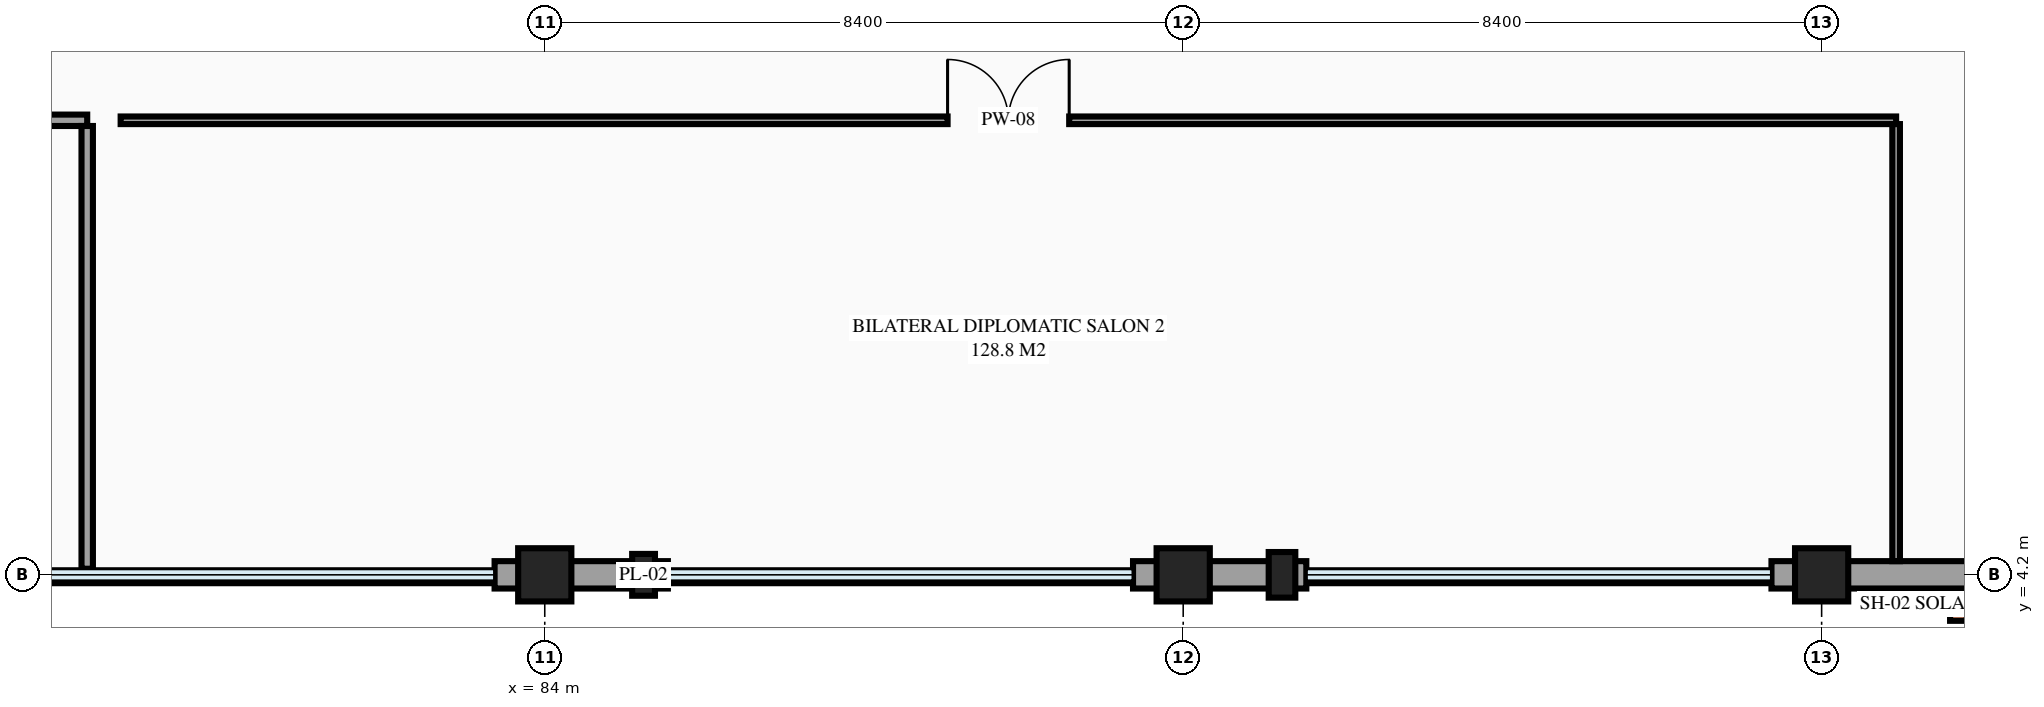
"""IFC4 building model, lengths in metres.
Left out: names, types, materials, properties, quantities, classifications, styles, units other than length and angle.
Written with IfcOpenShell. Run it as: python <this file> out.ifc"""

import sys

from ifc_helpers import new_model, si_unit, direction, frame, frame_2d, origin, origin_2d, place, context, subcontext, project, spatial, rectangle, extrude, element, fill, save


model = new_model("IFC4")
c1 = context("Model", 3, precision=1e-05, world=origin(), true_north=direction((0.0, 1.0)))
c2 = subcontext(c1, "Body", "Model", "MODEL_VIEW")
j1 = project(units=[si_unit("LENGTHUNIT", "METRE"), si_unit("PLANEANGLEUNIT", "RADIAN")], contexts=[c1])
p1 = place(None, origin())
s1 = spatial("IfcSite", under=j1, at=p1, CompositionType="ELEMENT")
p2 = place(p1, origin())
s2 = spatial("IfcBuilding", under=s1, at=p2, CompositionType="ELEMENT")
p3 = place(p2, frame((0.0, 0.0, 14.1)))
s3 = spatial("IfcBuildingStorey", under=s2, at=p3, CompositionType="ELEMENT", Elevation=14.1)
for number, where, z_axis, x_axis in (
    (1, (84.0, 4.2, 0.0), (0.0, 0.0, 1.0), (1.0, 0.0, 0.0)),
    (2, (92.4, 4.2, 0.0), (0.0, 0.0, 1.0), (1.0, 0.0, 0.0)),
    (3, (100.8, 4.2, 0.0), (0.0, 0.0, 1.0), (1.0, 0.0, 0.0)),
):
    element("IfcColumn", number, at=place(p3, frame(where, z_axis=z_axis, x_axis=x_axis)), inside=s3, PredefinedType="COLUMN", context=c2, shape_type="SweptSolid", body=[
        extrude(rectangle(XDim=0.7, YDim=0.7, at=origin_2d()), origin(), (0.0, 0.0, 1.0), 4.2),
    ])
p4 = place(p3, frame((85.3, 4.2, 0.0), z_axis=(0.0, 0.0, 1.0), x_axis=(1.0, 0.0, 0.0)))
e4 = element("IfcColumn", 4, at=p4, inside=s3, PredefinedType="PILASTER", context=c2, shape_type="SweptSolid", body=[
    extrude(rectangle(XDim=0.3, YDim=0.55, at=origin_2d()), origin(), (0.0, 0.0, 1.0), 4.2),
])
p5 = place(p3, frame((93.7, 4.2, 0.0), z_axis=(0.0, 0.0, 1.0), x_axis=(1.0, 0.0, 0.0)))
e5 = element("IfcColumn", 5, at=p5, inside=s3, PredefinedType="PILASTER", context=c2, shape_type="SweptSolid", body=[
    extrude(rectangle(XDim=0.35, YDim=0.6, at=origin_2d()), origin(), (0.0, 0.0, 1.0), 4.2),
])
p6 = place(p3, frame((83.34, 4.2, 0.0), z_axis=(0.0, 0.0, 1.0), x_axis=(1.0, 0.0, 0.0)))
e6 = element("IfcWall", 6, at=p6, inside=s3, PredefinedType="STANDARD", context=c2, shape_type="SweptSolid", body=[
    extrude(rectangle(XDim=0.66, YDim=0.36, at=frame_2d((0.33, 0.0))), origin(), (0.0, 0.0, 1.0), 4.2),
])
p7 = place(p3, frame((84.0, 4.2, 0.0), z_axis=(0.0, 0.0, 1.0), x_axis=(1.0, 0.0, 0.0)))
e7 = element("IfcWall", 7, at=p7, inside=s3, PredefinedType="STANDARD", context=c2, shape_type="SweptSolid", body=[
    extrude(rectangle(XDim=1.62, YDim=0.36, at=frame_2d((0.81, 0.0))), origin(), (0.0, 0.0, 1.0), 3.1),
])
p8 = place(p3, frame((91.74, 4.2, 0.0), z_axis=(0.0, 0.0, 1.0), x_axis=(1.0, 0.0, 0.0)))
e8 = element("IfcWall", 8, at=p8, inside=s3, PredefinedType="STANDARD", context=c2, shape_type="SweptSolid", body=[
    extrude(rectangle(XDim=0.66, YDim=0.36, at=frame_2d((0.33, 0.0))), origin(), (0.0, 0.0, 1.0), 4.2),
])
p9 = place(p3, frame((92.4, 4.2, 0.0), z_axis=(0.0, 0.0, 1.0), x_axis=(1.0, 0.0, 0.0)))
e9 = element("IfcWall", 9, at=p9, inside=s3, PredefinedType="STANDARD", context=c2, shape_type="SweptSolid", body=[
    extrude(rectangle(XDim=1.62, YDim=0.36, at=frame_2d((0.81, 0.0))), origin(), (0.0, 0.0, 1.0), 3.05),
])
p10 = place(p3, frame((100.14, 4.2, 0.0), z_axis=(0.0, 0.0, 1.0), x_axis=(1.0, 0.0, 0.0)))
e10 = element("IfcWall", 10, at=p10, inside=s3, PredefinedType="STANDARD", context=c2, shape_type="SweptSolid", body=[
    extrude(rectangle(XDim=0.66, YDim=0.36, at=frame_2d((0.33, 0.0))), origin(), (0.0, 0.0, 1.0), 4.2),
])
p11 = place(p3, frame((100.8, 4.2, 0.0), z_axis=(0.0, 0.0, 1.0), x_axis=(1.0, 0.0, 0.0)))
e11 = element("IfcWall", 11, at=p11, inside=s3, PredefinedType="STANDARD", context=c2, shape_type="SweptSolid", body=[
    extrude(rectangle(XDim=8.4, YDim=0.36, at=frame_2d((4.2, 0.0))), origin(), (0.0, 0.0, 1.0), 3.4),
])
p12 = place(p11, frame((3.45, 0.0, 0.75)))
e12 = element("IfcOpeningElement", 12, at=p12, cuts=e11, PredefinedType="OPENING", context=c2, shape_type="SweptSolid", body=[
    extrude(rectangle(XDim=1.5, YDim=1.5, at=frame_2d((0.75, 0.75))), frame((0.0, 0.19, 0.0), z_axis=(0.0, -1.0, 0.0), x_axis=(1.0, 0.0, 0.0)), (0.0, 0.0, 1.0), 0.38),
])
p13 = place(p3, frame((52.42, 10.18, 0.0), z_axis=(0.0, 0.0, 1.0), x_axis=(1.0, 0.0, 0.0)))
e13 = element("IfcWall", 13, at=p13, inside=s3, PredefinedType="PARTITIONING", context=c2, shape_type="SweptSolid", body=[
    extrude(rectangle(XDim=25.56, YDim=0.15, at=frame_2d((12.78, 0.0))), origin(), (0.0, 0.0, 1.0), 3.895),
])
p14 = place(p13, frame((11.63, 0.0, 0.0)))
e14 = element("IfcOpeningElement", 14, at=p14, cuts=e13, PredefinedType="OPENING", context=c2, shape_type="SweptSolid", body=[
    extrude(rectangle(XDim=1.6, YDim=2.25, at=frame_2d((0.8, 1.125))), frame((0.0, 0.085, 0.0), z_axis=(0.0, -1.0, 0.0), x_axis=(1.0, 0.0, 0.0)), (0.0, 0.0, 1.0), 0.17),
])
p15 = place(p3, frame((77.98, 4.28, 0.0), z_axis=(0.0, 0.0, 1.0), x_axis=(0.0, 1.0, 0.0)))
e15 = element("IfcWall", 15, at=p15, inside=s3, PredefinedType="PARTITIONING", context=c2, shape_type="SweptSolid", body=[
    extrude(rectangle(XDim=5.825, YDim=0.15, at=frame_2d((2.913, 0.0))), origin(), (0.0, 0.0, 1.0), 3.895),
])
p16 = place(p3, frame((78.42, 10.18, 0.0), z_axis=(0.0, 0.0, 1.0), x_axis=(1.0, 0.0, 0.0)))
e16 = element("IfcWall", 16, at=p16, inside=s3, PredefinedType="PARTITIONING", context=c2, shape_type="SweptSolid", body=[
    extrude(rectangle(XDim=23.36, YDim=0.1, at=frame_2d((11.68, 0.0))), origin(), (0.0, 0.0, 1.0), 3.895),
])
p17 = place(p16, frame((10.88, 0.0, 0.0)))
e17 = element("IfcOpeningElement", 17, at=p17, cuts=e16, PredefinedType="OPENING", context=c2, shape_type="SweptSolid", body=[
    extrude(rectangle(XDim=1.6, YDim=2.25, at=frame_2d((0.8, 1.125))), frame((0.0, 0.06, 0.0), z_axis=(0.0, -1.0, 0.0), x_axis=(1.0, 0.0, 0.0)), (0.0, 0.0, 1.0), 0.12),
])
p18 = place(p3, frame((101.78, 4.38, 0.0), z_axis=(0.0, 0.0, 1.0), x_axis=(0.0, 1.0, 0.0)))
e18 = element("IfcWall", 18, at=p18, inside=s3, PredefinedType="PARTITIONING", context=c2, shape_type="SweptSolid", body=[
    extrude(rectangle(XDim=5.75, YDim=0.1, at=frame_2d((2.875, 0.0))), origin(), (0.0, 0.0, 1.0), 3.895),
])
p19 = place(p17, origin())
e19 = element("IfcDoor", 19, at=p19, inside=s3, OperationType="DOUBLE_DOOR_SINGLE_SWING", PredefinedType="DOOR", context=c2, shape_type="SweptSolid", body=[
    extrude(rectangle(XDim=1.6, YDim=2.25, at=frame_2d((0.8, 1.125))), frame((0.0, 0.025, 0.0), z_axis=(0.0, -1.0, 0.0), x_axis=(1.0, 0.0, 0.0)), (0.0, 0.0, 1.0), 0.05),
])
fill(e17, e19)
save(model, sys.argv[1])
